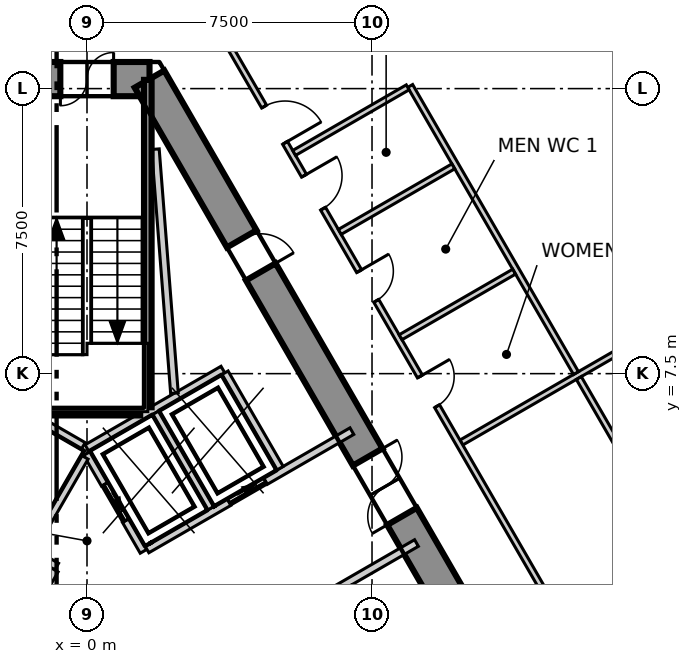
"""IFC4 building model, lengths in metres.
Left out: names, types, materials, properties, quantities, classifications, styles, units other than length and angle.
Written with IfcOpenShell. Run it as: python <this file> out.ifc"""

import sys

from ifc_helpers import new_model, si_unit, direction, frame, frame_2d, origin, place, context, subcontext, project, spatial, polyline, rectangle, outline, extrude, element, fill, save


model = new_model("IFC4")
c1 = context("Model", 3, precision=1e-05, world=origin(), true_north=direction((0.0, 1.0)))
c2 = subcontext(c1, "Body", "Model", "MODEL_VIEW")
j1 = project(units=[si_unit("LENGTHUNIT", "METRE"), si_unit("PLANEANGLEUNIT", "RADIAN")], contexts=[c1])
p1 = place(None, origin())
s1 = spatial("IfcSite", under=j1, at=p1, CompositionType="ELEMENT")
p2 = place(p1, origin())
s2 = spatial("IfcBuilding", under=s1, at=p2, CompositionType="ELEMENT")
p3 = place(p2, frame((0.0, 0.0, 59.3)))
s3 = spatial("IfcBuildingStorey", under=s2, at=p3, CompositionType="ELEMENT", Elevation=59.3)
p4 = place(p3, frame((1.645, 15.25, -0.3), z_axis=(0.0, 0.0, 1.0), x_axis=(-1.0, 0.0, 0.0)))
e1 = element("IfcWall", 1, at=p4, inside=s3, PredefinedType="SHEAR", context=c2, shape_type="SweptSolid", body=[
    extrude(outline(polyline([(-0.26, -0.45), (1.645, -0.45), (3.55, -0.45), (3.031, 0.45), (1.645, 0.45), (0.259, 0.45), (-0.26, -0.45)])), origin(), (0.0, 0.0, 1.0), 4.0),
])
p5 = place(p4, frame((0.945, 0.0, 0.3)))
e2 = element("IfcOpeningElement", 2, at=p5, cuts=e1, PredefinedType="OPENING", context=c2, shape_type="SweptSolid", body=[
    extrude(rectangle(XDim=1.4, YDim=2.1, at=frame_2d((0.7, 1.05))), frame((0.0, 0.46, 0.0), z_axis=(0.0, -1.0, 0.0), x_axis=(1.0, 0.0, 0.0)), (0.0, 0.0, 1.0), 0.92),
])
p6 = place(p3, frame((14.03, -6.2, -0.3), z_axis=(0.0, 0.0, 1.0), x_axis=(-0.500026485275, 0.866010111964, 0.0)))
e3 = element("IfcWall", 3, at=p6, inside=s3, PredefinedType="SHEAR", context=c2, shape_type="SweptSolid", body=[
    extrude(outline(polyline([(-0.26, -0.449), (1.685, -0.449), (3.63, -0.449), (5.576, -0.449), (7.521, -0.449), (9.466, -0.449), (11.411, -0.449), (13.357, -0.449), (15.302, -0.449), (17.247, -0.45), (19.192, -0.45), (21.138, -0.45), (23.083, -0.45), (25.028, -0.45), (24.509, 0.449), (22.644, 0.449), (20.778, 0.449), (18.913, 0.449), (17.048, 0.449), (15.182, 0.449), (13.317, 0.449), (11.452, 0.449), (9.587, 0.449), (7.721, 0.45), (5.856, 0.45), (3.991, 0.45), (2.125, 0.45), (0.26, 0.45), (-0.26, -0.449)])), origin(), (0.0, 0.0, 1.0), 4.0),
])
p7 = place(p6, frame((11.484, 0.0, 0.3)))
e4 = element("IfcOpeningElement", 4, at=p7, cuts=e3, PredefinedType="OPENING", context=c2, shape_type="SweptSolid", body=[
    extrude(rectangle(XDim=1.8, YDim=2.1, at=frame_2d((0.9, 1.05))), frame((0.0, 0.46, 0.0), z_axis=(0.0, -1.0, 0.0), x_axis=(1.0, 0.0, 0.0)), (0.0, 0.0, 1.0), 0.92),
])
p8 = place(p6, frame((18.914, 0.0, 0.3)))
e5 = element("IfcOpeningElement", 5, at=p8, cuts=e3, PredefinedType="OPENING", context=c2, shape_type="SweptSolid", body=[
    extrude(rectangle(XDim=1.0, YDim=2.1, at=frame_2d((0.5, 1.05))), frame((0.0, 0.46, 0.0), z_axis=(0.0, -1.0, 0.0), x_axis=(1.0, 0.0, 0.0)), (0.0, 0.0, 1.0), 0.92),
])
p9 = place(p3, frame((34.241, -15.876, 0.0), z_axis=(0.0, 0.0, 1.0), x_axis=(-0.500006313899, 0.866021758423, 0.0)))
e6 = element("IfcWall", 6, at=p9, inside=s3, PredefinedType="ELEMENTEDWALL", context=c2, shape_type="SweptSolid", body=[
    extrude(rectangle(XDim=61.719, YDim=0.2, at=frame_2d((30.859, 0.0))), origin(), (0.0, 0.0, 1.0), 3.7),
])
p10 = place(p9, frame((2.199, 0.0, 0.9)))
e7 = element("IfcOpeningElement", 7, at=p10, cuts=e6, PredefinedType="OPENING", context=c2, shape_type="SweptSolid", body=[
    extrude(rectangle(XDim=5.6, YDim=2.5, at=frame_2d((2.8, 1.25))), frame((0.0, 0.11, 0.0), z_axis=(0.0, -1.0, 0.0), x_axis=(1.0, 0.0, 0.0)), (0.0, 0.0, 1.0), 0.22),
])
p11 = place(p9, frame((9.59, 0.0, 0.9)))
e8 = element("IfcOpeningElement", 8, at=p11, cuts=e6, PredefinedType="OPENING", context=c2, shape_type="SweptSolid", body=[
    extrude(rectangle(XDim=5.6, YDim=2.5, at=frame_2d((2.8, 1.25))), frame((0.0, 0.11, 0.0), z_axis=(0.0, -1.0, 0.0), x_axis=(1.0, 0.0, 0.0)), (0.0, 0.0, 1.0), 0.22),
])
p12 = place(p9, frame((16.982, 0.0, 0.9)))
e9 = element("IfcOpeningElement", 9, at=p12, cuts=e6, PredefinedType="OPENING", context=c2, shape_type="SweptSolid", body=[
    extrude(rectangle(XDim=5.6, YDim=2.5, at=frame_2d((2.8, 1.25))), frame((0.0, 0.11, 0.0), z_axis=(0.0, -1.0, 0.0), x_axis=(1.0, 0.0, 0.0)), (0.0, 0.0, 1.0), 0.22),
])
p13 = place(p9, frame((24.374, 0.0, 0.9)))
e10 = element("IfcOpeningElement", 10, at=p13, cuts=e6, PredefinedType="OPENING", context=c2, shape_type="SweptSolid", body=[
    extrude(rectangle(XDim=5.6, YDim=2.5, at=frame_2d((2.8, 1.25))), frame((0.0, 0.11, 0.0), z_axis=(0.0, -1.0, 0.0), x_axis=(1.0, 0.0, 0.0)), (0.0, 0.0, 1.0), 0.22),
])
p14 = place(p9, frame((31.765, 0.0, 0.9)))
e11 = element("IfcOpeningElement", 11, at=p14, cuts=e6, PredefinedType="OPENING", context=c2, shape_type="SweptSolid", body=[
    extrude(rectangle(XDim=5.6, YDim=2.5, at=frame_2d((2.8, 1.25))), frame((0.0, 0.11, 0.0), z_axis=(0.0, -1.0, 0.0), x_axis=(1.0, 0.0, 0.0)), (0.0, 0.0, 1.0), 0.22),
])
p15 = place(p9, frame((39.157, 0.0, 0.9)))
e12 = element("IfcOpeningElement", 12, at=p15, cuts=e6, PredefinedType="OPENING", context=c2, shape_type="SweptSolid", body=[
    extrude(rectangle(XDim=5.6, YDim=2.5, at=frame_2d((2.8, 1.25))), frame((0.0, 0.11, 0.0), z_axis=(0.0, -1.0, 0.0), x_axis=(1.0, 0.0, 0.0)), (0.0, 0.0, 1.0), 0.22),
])
p16 = place(p9, frame((46.549, 0.0, 0.9)))
e13 = element("IfcOpeningElement", 13, at=p16, cuts=e6, PredefinedType="OPENING", context=c2, shape_type="SweptSolid", body=[
    extrude(rectangle(XDim=5.6, YDim=2.5, at=frame_2d((2.8, 1.25))), frame((0.0, 0.11, 0.0), z_axis=(0.0, -1.0, 0.0), x_axis=(1.0, 0.0, 0.0)), (0.0, 0.0, 1.0), 0.22),
])
p17 = place(p9, frame((53.94, 0.0, 0.9)))
e14 = element("IfcOpeningElement", 14, at=p17, cuts=e6, PredefinedType="OPENING", context=c2, shape_type="SweptSolid", body=[
    extrude(rectangle(XDim=5.6, YDim=2.5, at=frame_2d((2.8, 1.25))), frame((0.0, 0.11, 0.0), z_axis=(0.0, -1.0, 0.0), x_axis=(1.0, 0.0, 0.0)), (0.0, 0.0, 1.0), 0.22),
])
p18 = place(p3, frame((9.851, 5.687, 0.0), z_axis=(0.0, 0.0, 1.0), x_axis=(0.865968814955, 0.500098001921, 0.0)))
e15 = element("IfcWall", 15, at=p18, inside=s3, PredefinedType="PARTITIONING", context=c2, shape_type="SweptSolid", body=[
    extrude(rectangle(XDim=10.26, YDim=0.15, at=frame_2d((5.13, 0.0))), origin(), (0.0, 0.0, 1.0), 3.2),
])
p19 = place(p3, frame((-19.497, -11.17, 0.0), z_axis=(0.0, 0.0, 1.0), x_axis=(0.499998854553, 0.866026065108, 0.0)))
e16 = element("IfcWall", 16, at=p19, inside=s3, PredefinedType="PARTITIONING", context=c2, shape_type="SweptSolid", body=[
    extrude(rectangle(XDim=38.994, YDim=0.15, at=frame_2d((19.497, 0.0))), origin(), (0.0, 0.0, 1.0), 3.7),
])
p20 = place(p19, frame((36.044, 0.0, 0.0)))
e17 = element("IfcOpeningElement", 17, at=p20, cuts=e16, PredefinedType="OPENING", context=c2, shape_type="SweptSolid", body=[
    extrude(rectangle(XDim=1.1, YDim=2.1, at=frame_2d((0.55, 1.05))), frame((0.0, 0.085, 0.0), z_axis=(0.0, -1.0, 0.0), x_axis=(1.0, 0.0, 0.0)), (0.0, 0.0, 1.0), 0.17),
])
p21 = place(p19, frame((21.855, 0.0, 0.0)))
e18 = element("IfcOpeningElement", 18, at=p21, cuts=e16, PredefinedType="OPENING", context=c2, shape_type="SweptSolid", body=[
    extrude(rectangle(XDim=1.1, YDim=2.1, at=frame_2d((0.55, 1.05))), frame((0.0, 0.085, 0.0), z_axis=(0.0, -1.0, 0.0), x_axis=(1.0, 0.0, 0.0)), (0.0, 0.0, 1.0), 0.17),
])
p22 = place(p19, frame((32.155, 0.0, 0.0)))
e19 = element("IfcOpeningElement", 19, at=p22, cuts=e16, PredefinedType="OPENING", context=c2, shape_type="SweptSolid", body=[
    extrude(rectangle(XDim=0.9, YDim=2.1, at=frame_2d((0.45, 1.05))), frame((0.0, 0.085, 0.0), z_axis=(0.0, -1.0, 0.0), x_axis=(1.0, 0.0, 0.0)), (0.0, 0.0, 1.0), 0.17),
])
p23 = place(p19, frame((28.955, 0.0, 0.0)))
e20 = element("IfcOpeningElement", 20, at=p23, cuts=e16, PredefinedType="OPENING", context=c2, shape_type="SweptSolid", body=[
    extrude(rectangle(XDim=0.9, YDim=2.1, at=frame_2d((0.45, 1.05))), frame((0.0, 0.085, 0.0), z_axis=(0.0, -1.0, 0.0), x_axis=(1.0, 0.0, 0.0)), (0.0, 0.0, 1.0), 0.17),
])
p24 = place(p19, frame((26.055, 0.0, 0.0)))
e21 = element("IfcOpeningElement", 21, at=p24, cuts=e16, PredefinedType="OPENING", context=c2, shape_type="SweptSolid", body=[
    extrude(rectangle(XDim=1.0, YDim=2.1, at=frame_2d((0.5, 1.05))), frame((0.0, 0.085, 0.0), z_axis=(0.0, -1.0, 0.0), x_axis=(1.0, 0.0, 0.0)), (0.0, 0.0, 1.0), 0.17),
])
p25 = place(p19, frame((10.373, 0.0, 0.0)))
e22 = element("IfcOpeningElement", 22, at=p25, cuts=e16, PredefinedType="OPENING", context=c2, shape_type="SweptSolid", body=[
    extrude(rectangle(XDim=1.0, YDim=2.1, at=frame_2d((0.5, 1.05))), frame((0.0, 0.085, 0.0), z_axis=(0.0, -1.0, 0.0), x_axis=(1.0, 0.0, 0.0)), (0.0, 0.0, 1.0), 0.17),
])
p26 = place(p19, frame((17.773, 0.0, 0.0)))
e23 = element("IfcOpeningElement", 23, at=p26, cuts=e16, PredefinedType="OPENING", context=c2, shape_type="SweptSolid", body=[
    extrude(rectangle(XDim=0.9, YDim=2.1, at=frame_2d((0.45, 1.05))), frame((0.0, 0.085, 0.0), z_axis=(0.0, -1.0, 0.0), x_axis=(1.0, 0.0, 0.0)), (0.0, 0.0, 1.0), 0.17),
])
p27 = place(p19, frame((1.689, 0.0, 0.0)))
e24 = element("IfcOpeningElement", 24, at=p27, cuts=e16, PredefinedType="OPENING", context=c2, shape_type="SweptSolid", body=[
    extrude(rectangle(XDim=1.1, YDim=2.1, at=frame_2d((0.55, 1.05))), frame((0.0, 0.085, 0.0), z_axis=(0.0, -1.0, 0.0), x_axis=(1.0, 0.0, 0.0)), (0.0, 0.0, 1.0), 0.17),
])
p28 = place(p3, frame((0.075, 22.47, 0.0), z_axis=(0.0, 0.0, 1.0), x_axis=(0.500002280369, -0.866024087209, 0.0)))
e25 = element("IfcWall", 25, at=p28, inside=s3, PredefinedType="PARTITIONING", context=c2, shape_type="SweptSolid", body=[
    extrude(rectangle(XDim=38.844, YDim=0.15, at=frame_2d((19.422, 0.0))), origin(), (0.0, 0.0, 1.0), 3.7),
])
p29 = place(p28, frame((36.044, 0.0, 0.0)))
e26 = element("IfcOpeningElement", 26, at=p29, cuts=e25, PredefinedType="OPENING", context=c2, shape_type="SweptSolid", body=[
    extrude(rectangle(XDim=1.1, YDim=2.1, at=frame_2d((0.55, 1.05))), frame((0.0, 0.085, 0.0), z_axis=(0.0, -1.0, 0.0), x_axis=(1.0, 0.0, 0.0)), (0.0, 0.0, 1.0), 0.17),
])
p30 = place(p28, frame((26.255, 0.0, 0.0)))
e27 = element("IfcOpeningElement", 27, at=p30, cuts=e25, PredefinedType="OPENING", context=c2, shape_type="SweptSolid", body=[
    extrude(rectangle(XDim=1.1, YDim=2.1, at=frame_2d((0.55, 1.05))), frame((0.0, 0.085, 0.0), z_axis=(0.0, -1.0, 0.0), x_axis=(1.0, 0.0, 0.0)), (0.0, 0.0, 1.0), 0.17),
])
p31 = place(p28, frame((9.173, 0.0, 0.0)))
e28 = element("IfcOpeningElement", 28, at=p31, cuts=e25, PredefinedType="OPENING", context=c2, shape_type="SweptSolid", body=[
    extrude(rectangle(XDim=1.1, YDim=2.1, at=frame_2d((0.55, 1.05))), frame((0.0, 0.085, 0.0), z_axis=(0.0, -1.0, 0.0), x_axis=(1.0, 0.0, 0.0)), (0.0, 0.0, 1.0), 0.17),
])
p32 = place(p28, frame((17.373, 0.0, 0.0)))
e29 = element("IfcOpeningElement", 29, at=p32, cuts=e25, PredefinedType="OPENING", context=c2, shape_type="SweptSolid", body=[
    extrude(rectangle(XDim=0.9, YDim=2.1, at=frame_2d((0.45, 1.05))), frame((0.0, 0.085, 0.0), z_axis=(0.0, -1.0, 0.0), x_axis=(1.0, 0.0, 0.0)), (0.0, 0.0, 1.0), 0.17),
])
p33 = place(p28, frame((14.173, 0.0, 0.0)))
e30 = element("IfcOpeningElement", 30, at=p33, cuts=e25, PredefinedType="OPENING", context=c2, shape_type="SweptSolid", body=[
    extrude(rectangle(XDim=0.9, YDim=2.1, at=frame_2d((0.45, 1.05))), frame((0.0, 0.085, 0.0), z_axis=(0.0, -1.0, 0.0), x_axis=(1.0, 0.0, 0.0)), (0.0, 0.0, 1.0), 0.17),
])
p34 = place(p28, frame((11.273, 0.0, 0.0)))
e31 = element("IfcOpeningElement", 31, at=p34, cuts=e25, PredefinedType="OPENING", context=c2, shape_type="SweptSolid", body=[
    extrude(rectangle(XDim=1.0, YDim=2.1, at=frame_2d((0.5, 1.05))), frame((0.0, 0.085, 0.0), z_axis=(0.0, -1.0, 0.0), x_axis=(1.0, 0.0, 0.0)), (0.0, 0.0, 1.0), 0.17),
])
p35 = place(p28, frame((1.689, 0.0, 0.0)))
e32 = element("IfcOpeningElement", 32, at=p35, cuts=e25, PredefinedType="OPENING", context=c2, shape_type="SweptSolid", body=[
    extrude(rectangle(XDim=1.1, YDim=2.1, at=frame_2d((0.55, 1.05))), frame((0.0, 0.085, 0.0), z_axis=(0.0, -1.0, 0.0), x_axis=(1.0, 0.0, 0.0)), (0.0, 0.0, 1.0), 0.17),
])
p36 = place(p3, frame((8.504, 15.07, 0.0), z_axis=(0.0, 0.0, 1.0), x_axis=(0.500042162787, -0.86600105972, 0.0)))
e33 = element("IfcWall", 33, at=p36, inside=s3, PredefinedType="PARTITIONING", context=c2, shape_type="SweptSolid", body=[
    extrude(rectangle(XDim=8.725, YDim=0.15, at=frame_2d((4.363, 0.0))), origin(), (0.0, 0.0, 1.0), 3.7),
])
for number, where, z_axis, x_axis in (
    (34, (5.451, 13.308, 0.0), (0.0, 0.0, 1.0), (0.866, 0.5, 0.0)),
    (35, (6.651, 11.229, 0.0), (0.0, 0.0, 1.0), (0.866, 0.5, 0.0)),
    (36, (8.251, 8.458, 0.0), (0.0, 0.0, 1.0), (0.866, 0.5, 0.0)),
):
    element("IfcWall", number, at=place(p3, frame(where, z_axis=z_axis, x_axis=x_axis)), inside=s3, PredefinedType="PARTITIONING", context=c2, shape_type="SweptSolid", body=[
        extrude(rectangle(XDim=3.45, YDim=0.15, at=frame_2d((1.725, 0.0))), origin(), (0.0, 0.0, 1.0), 3.7),
    ])
p37 = place(p3, frame((12.942, 7.384, 0.0), z_axis=(0.0, 0.0, 1.0), x_axis=(0.499995423472, -0.866028046028, 0.0)))
e37 = element("IfcWall", 37, at=p37, inside=s3, PredefinedType="PARTITIONING", context=c2, shape_type="SweptSolid", body=[
    extrude(rectangle(XDim=14.633, YDim=0.15, at=frame_2d((7.316, 0.0))), origin(), (0.0, 0.0, 1.0), 3.7),
])
p38 = place(p37, frame((6.857, 0.0, 0.0)))
e38 = element("IfcOpeningElement", 38, at=p38, cuts=e37, PredefinedType="OPENING", context=c2, shape_type="SweptSolid", body=[
    extrude(rectangle(XDim=1.0, YDim=2.1, at=frame_2d((0.5, 1.05))), frame((0.0, 0.085, 0.0), z_axis=(0.0, -1.0, 0.0), x_axis=(1.0, 0.0, 0.0)), (0.0, 0.0, 1.0), 0.17),
])
p39 = place(p3, frame((-0.002, 5.541, 0.0), z_axis=(0.0, 0.0, 1.0), x_axis=(0.86600155993, 0.500041296494, 0.0)))
e39 = element("IfcWall", 39, at=p39, inside=s3, PredefinedType="SOLIDWALL", context=c2, shape_type="SweptSolid", body=[
    extrude(rectangle(XDim=4.132, YDim=0.2, at=frame_2d((2.066, 0.0))), origin(), (0.0, 0.0, 1.0), 3.7),
])
p40 = place(p3, frame((0.0, 5.4, 0.0), z_axis=(0.0, 0.0, 1.0), x_axis=(0.500103862429, -0.865965430478, 0.0)))
e40 = element("IfcWall", 40, at=p40, inside=s3, PredefinedType="SOLIDWALL", context=c2, shape_type="SweptSolid", body=[
    extrude(rectangle(XDim=2.973, YDim=0.2, at=frame_2d((1.487, 0.0))), origin(), (0.0, 0.0, 1.0), 3.7),
])
p41 = place(p40, frame((0.937, 0.0, 0.0)))
e41 = element("IfcOpeningElement", 41, at=p41, cuts=e40, PredefinedType="OPENING", context=c2, shape_type="SweptSolid", body=[
    extrude(rectangle(XDim=1.1, YDim=2.1, at=frame_2d((0.55, 1.05))), frame((0.0, 0.11, 0.0), z_axis=(0.0, -1.0, 0.0), x_axis=(1.0, 0.0, 0.0)), (0.0, 0.0, 1.0), 0.22),
])
p42 = place(p3, frame((1.578, 2.874, 0.0), z_axis=(0.0, 0.0, 1.0), x_axis=(0.866031483044, 0.499989470266, 0.0)))
e42 = element("IfcWall", 42, at=p42, inside=s3, PredefinedType="SOLIDWALL", context=c2, shape_type="SweptSolid", body=[
    extrude(rectangle(XDim=6.226, YDim=0.2, at=frame_2d((3.113, 0.0))), origin(), (0.0, 0.0, 1.0), 3.7),
])
p43 = place(p42, frame((2.496, 0.0, 0.0)))
e43 = element("IfcOpeningElement", 43, at=p43, cuts=e42, PredefinedType="OPENING", context=c2, shape_type="SweptSolid", body=[
    extrude(rectangle(XDim=1.1, YDim=2.1, at=frame_2d((0.55, 1.05))), frame((0.0, 0.11, 0.0), z_axis=(0.0, -1.0, 0.0), x_axis=(1.0, 0.0, 0.0)), (0.0, 0.0, 1.0), 0.22),
])
p44 = place(p3, frame((3.278, -0.071, 0.0), z_axis=(0.0, 0.0, 1.0), x_axis=(0.865953757655, 0.500124074208, 0.0)))
e44 = element("IfcWall", 44, at=p44, inside=s3, PredefinedType="SOLIDWALL", context=c2, shape_type="SweptSolid", body=[
    extrude(rectangle(XDim=6.227, YDim=0.2, at=frame_2d((3.113, 0.0))), origin(), (0.0, 0.0, 1.0), 3.7),
])
for number, where, z_axis, x_axis in (
    (45, (3.626, 7.52, 0.0), (0.0, 0.0, 1.0), (0.5, -0.866, 0.0)),
    (46, (1.807, 6.47, 0.0), (0.0, 0.0, 1.0), (0.5, -0.866, 0.0)),
):
    element("IfcWall", number, at=place(p3, frame(where, z_axis=z_axis, x_axis=x_axis)), inside=s3, PredefinedType="SOLIDWALL", context=c2, shape_type="SweptSolid", body=[
        extrude(rectangle(XDim=2.9, YDim=0.2, at=frame_2d((1.45, 0.0))), origin(), (0.0, 0.0, 1.0), 3.7),
    ])
p45 = place(p3, frame((-1.488, 2.822, 0.0), z_axis=(0.0, 0.0, 1.0), x_axis=(0.866236612152, -0.499633997809, 0.0)))
e47 = element("IfcWall", 47, at=p45, inside=s3, PredefinedType="SOLIDWALL", context=c2, shape_type="SweptSolid", body=[
    extrude(rectangle(XDim=0.796, YDim=0.2, at=frame_2d((0.398, 0.0))), origin(), (0.0, 0.0, 1.0), 3.7),
])
p46 = place(p3, frame((-2.444, -0.433, 0.0), z_axis=(0.0, 0.0, 1.0), x_axis=(0.500035624827, 0.866004834804, 0.0)))
e48 = element("IfcWall", 48, at=p46, inside=s3, PredefinedType="SOLIDWALL", context=c2, shape_type="SweptSolid", body=[
    extrude(rectangle(XDim=3.194, YDim=0.2, at=frame_2d((1.597, 0.0))), origin(), (0.0, 0.0, 1.0), 3.7),
])
p47 = place(p3, frame((-1.67, 6.507, 0.0), z_axis=(0.0, 0.0, 1.0), x_axis=(0.865941441609, -0.500145398563, 0.0)))
e49 = element("IfcWall", 49, at=p47, inside=s3, PredefinedType="SOLIDWALL", context=c2, shape_type="SweptSolid", body=[
    extrude(rectangle(XDim=1.815, YDim=0.2, at=frame_2d((0.908, 0.0))), origin(), (0.0, 0.0, 1.0), 3.7),
])
p48 = place(p3, frame((-1.438, 2.909, 0.0), z_axis=(0.0, 0.0, 1.0), x_axis=(0.499829630636, 0.866123744241, 0.0)))
e50 = element("IfcWall", 50, at=p48, inside=s3, PredefinedType="SOLIDWALL", context=c2, shape_type="SweptSolid", body=[
    extrude(rectangle(XDim=2.761, YDim=0.2, at=frame_2d((1.38, 0.0))), origin(), (0.0, 0.0, 1.0), 3.7),
])
p49 = place(p3, frame((1.8, 13.406, 0.0), z_axis=(0.0, 0.0, 1.0), x_axis=(0.077809933421, -0.996968211259, 0.0)))
e51 = element("IfcWall", 51, at=p49, inside=s3, PredefinedType="SOLIDWALL", context=c2, shape_type="SweptSolid", body=[
    extrude(rectangle(XDim=6.438, YDim=0.2, at=frame_2d((3.219, 0.0))), origin(), (0.0, 0.0, 1.0), 3.7),
])
p50 = place(p3, frame((1.6, 6.615, 0.0), z_axis=(0.0, 0.0, 1.0), x_axis=(0.0, 1.0, 0.0)))
e52 = element("IfcWall", 52, at=p50, inside=s3, PredefinedType="SOLIDWALL", context=c2, shape_type="SweptSolid", body=[
    extrude(rectangle(XDim=8.615, YDim=0.2, at=frame_2d((4.308, 0.0))), origin(), (0.0, 0.0, 1.0), 3.7),
])
p51 = place(p3, frame((-1.4, 6.5, 0.0), z_axis=(0.0, 0.0, 1.0), x_axis=(1.0, 0.0, 0.0)))
e53 = element("IfcWall", 53, at=p51, inside=s3, PredefinedType="SOLIDWALL", context=c2, shape_type="SweptSolid", body=[
    extrude(rectangle(XDim=2.8, YDim=0.2, at=frame_2d((1.4, 0.0))), origin(), (0.0, 0.0, 1.0), 3.7),
])
p52 = place(p41, origin())
e54 = element("IfcDoor", 54, at=p52, inside=s3, OperationType="SLIDING_TO_LEFT", PredefinedType="DOOR", context=c2, shape_type="SweptSolid", body=[
    extrude(rectangle(XDim=1.1, YDim=2.1, at=frame_2d((0.55, 1.05))), frame((0.0, 0.025, 0.0), z_axis=(0.0, -1.0, 0.0), x_axis=(1.0, 0.0, 0.0)), (0.0, 0.0, 1.0), 0.05),
])
fill(e41, e54)
p53 = place(p43, origin())
e55 = element("IfcDoor", 55, at=p53, inside=s3, OperationType="SLIDING_TO_LEFT", PredefinedType="DOOR", context=c2, shape_type="SweptSolid", body=[
    extrude(rectangle(XDim=1.1, YDim=2.1, at=frame_2d((0.55, 1.05))), frame((0.0, 0.025, 0.0), z_axis=(0.0, -1.0, 0.0), x_axis=(1.0, 0.0, 0.0)), (0.0, 0.0, 1.0), 0.05),
])
fill(e43, e55)
p54 = place(p31, origin())
e56 = element("IfcDoor", 56, at=p54, inside=s3, OperationType="SINGLE_SWING_LEFT", PredefinedType="DOOR", context=c2, shape_type="SweptSolid", body=[
    extrude(rectangle(XDim=1.1, YDim=2.1, at=frame_2d((0.55, 1.05))), frame((0.0, 0.025, 0.0), z_axis=(0.0, -1.0, 0.0), x_axis=(1.0, 0.0, 0.0)), (0.0, 0.0, 1.0), 0.05),
])
fill(e28, e56)
p55 = place(p32, origin())
e57 = element("IfcDoor", 57, at=p55, inside=s3, OperationType="SINGLE_SWING_RIGHT", PredefinedType="DOOR", context=c2, shape_type="SweptSolid", body=[
    extrude(rectangle(XDim=0.9, YDim=2.1, at=frame_2d((0.45, 1.05))), frame((0.0, 0.025, 0.0), z_axis=(0.0, -1.0, 0.0), x_axis=(1.0, 0.0, 0.0)), (0.0, 0.0, 1.0), 0.05),
])
fill(e29, e57)
p56 = place(p33, origin())
e58 = element("IfcDoor", 58, at=p56, inside=s3, OperationType="SINGLE_SWING_RIGHT", PredefinedType="DOOR", context=c2, shape_type="SweptSolid", body=[
    extrude(rectangle(XDim=0.9, YDim=2.1, at=frame_2d((0.45, 1.05))), frame((0.0, 0.025, 0.0), z_axis=(0.0, -1.0, 0.0), x_axis=(1.0, 0.0, 0.0)), (0.0, 0.0, 1.0), 0.05),
])
fill(e30, e58)
p57 = place(p34, origin())
e59 = element("IfcDoor", 59, at=p57, inside=s3, OperationType="SINGLE_SWING_RIGHT", PredefinedType="DOOR", context=c2, shape_type="SweptSolid", body=[
    extrude(rectangle(XDim=1.0, YDim=2.1, at=frame_2d((0.5, 1.05))), frame((0.0, 0.025, 0.0), z_axis=(0.0, -1.0, 0.0), x_axis=(1.0, 0.0, 0.0)), (0.0, 0.0, 1.0), 0.05),
])
fill(e31, e59)
p58 = place(p7, origin())
e60 = element("IfcDoor", 60, at=p58, inside=s3, OperationType="DOUBLE_DOOR_SINGLE_SWING", PredefinedType="DOOR", context=c2, shape_type="SweptSolid", body=[
    extrude(rectangle(XDim=1.8, YDim=2.1, at=frame_2d((0.9, 1.05))), frame((0.0, 0.025, 0.0), z_axis=(0.0, -1.0, 0.0), x_axis=(1.0, 0.0, 0.0)), (0.0, 0.0, 1.0), 0.05),
])
fill(e4, e60)
p59 = place(p5, origin())
e61 = element("IfcDoor", 61, at=p59, inside=s3, OperationType="DOUBLE_DOOR_SINGLE_SWING", PredefinedType="DOOR", context=c2, shape_type="SweptSolid", body=[
    extrude(rectangle(XDim=1.4, YDim=2.1, at=frame_2d((0.7, 1.05))), frame((0.0, 0.025, 0.0), z_axis=(0.0, -1.0, 0.0), x_axis=(1.0, 0.0, 0.0)), (0.0, 0.0, 1.0), 0.05),
])
fill(e2, e61)
p60 = place(p8, origin())
e62 = element("IfcDoor", 62, at=p60, inside=s3, OperationType="SINGLE_SWING_LEFT", PredefinedType="DOOR", context=c2, shape_type="SweptSolid", body=[
    extrude(rectangle(XDim=1.0, YDim=2.1, at=frame_2d((0.5, 1.05))), frame((0.0, 0.025, 0.0), z_axis=(0.0, -1.0, 0.0), x_axis=(1.0, 0.0, 0.0)), (0.0, 0.0, 1.0), 0.05),
])
fill(e5, e62)
save(model, sys.argv[1])
